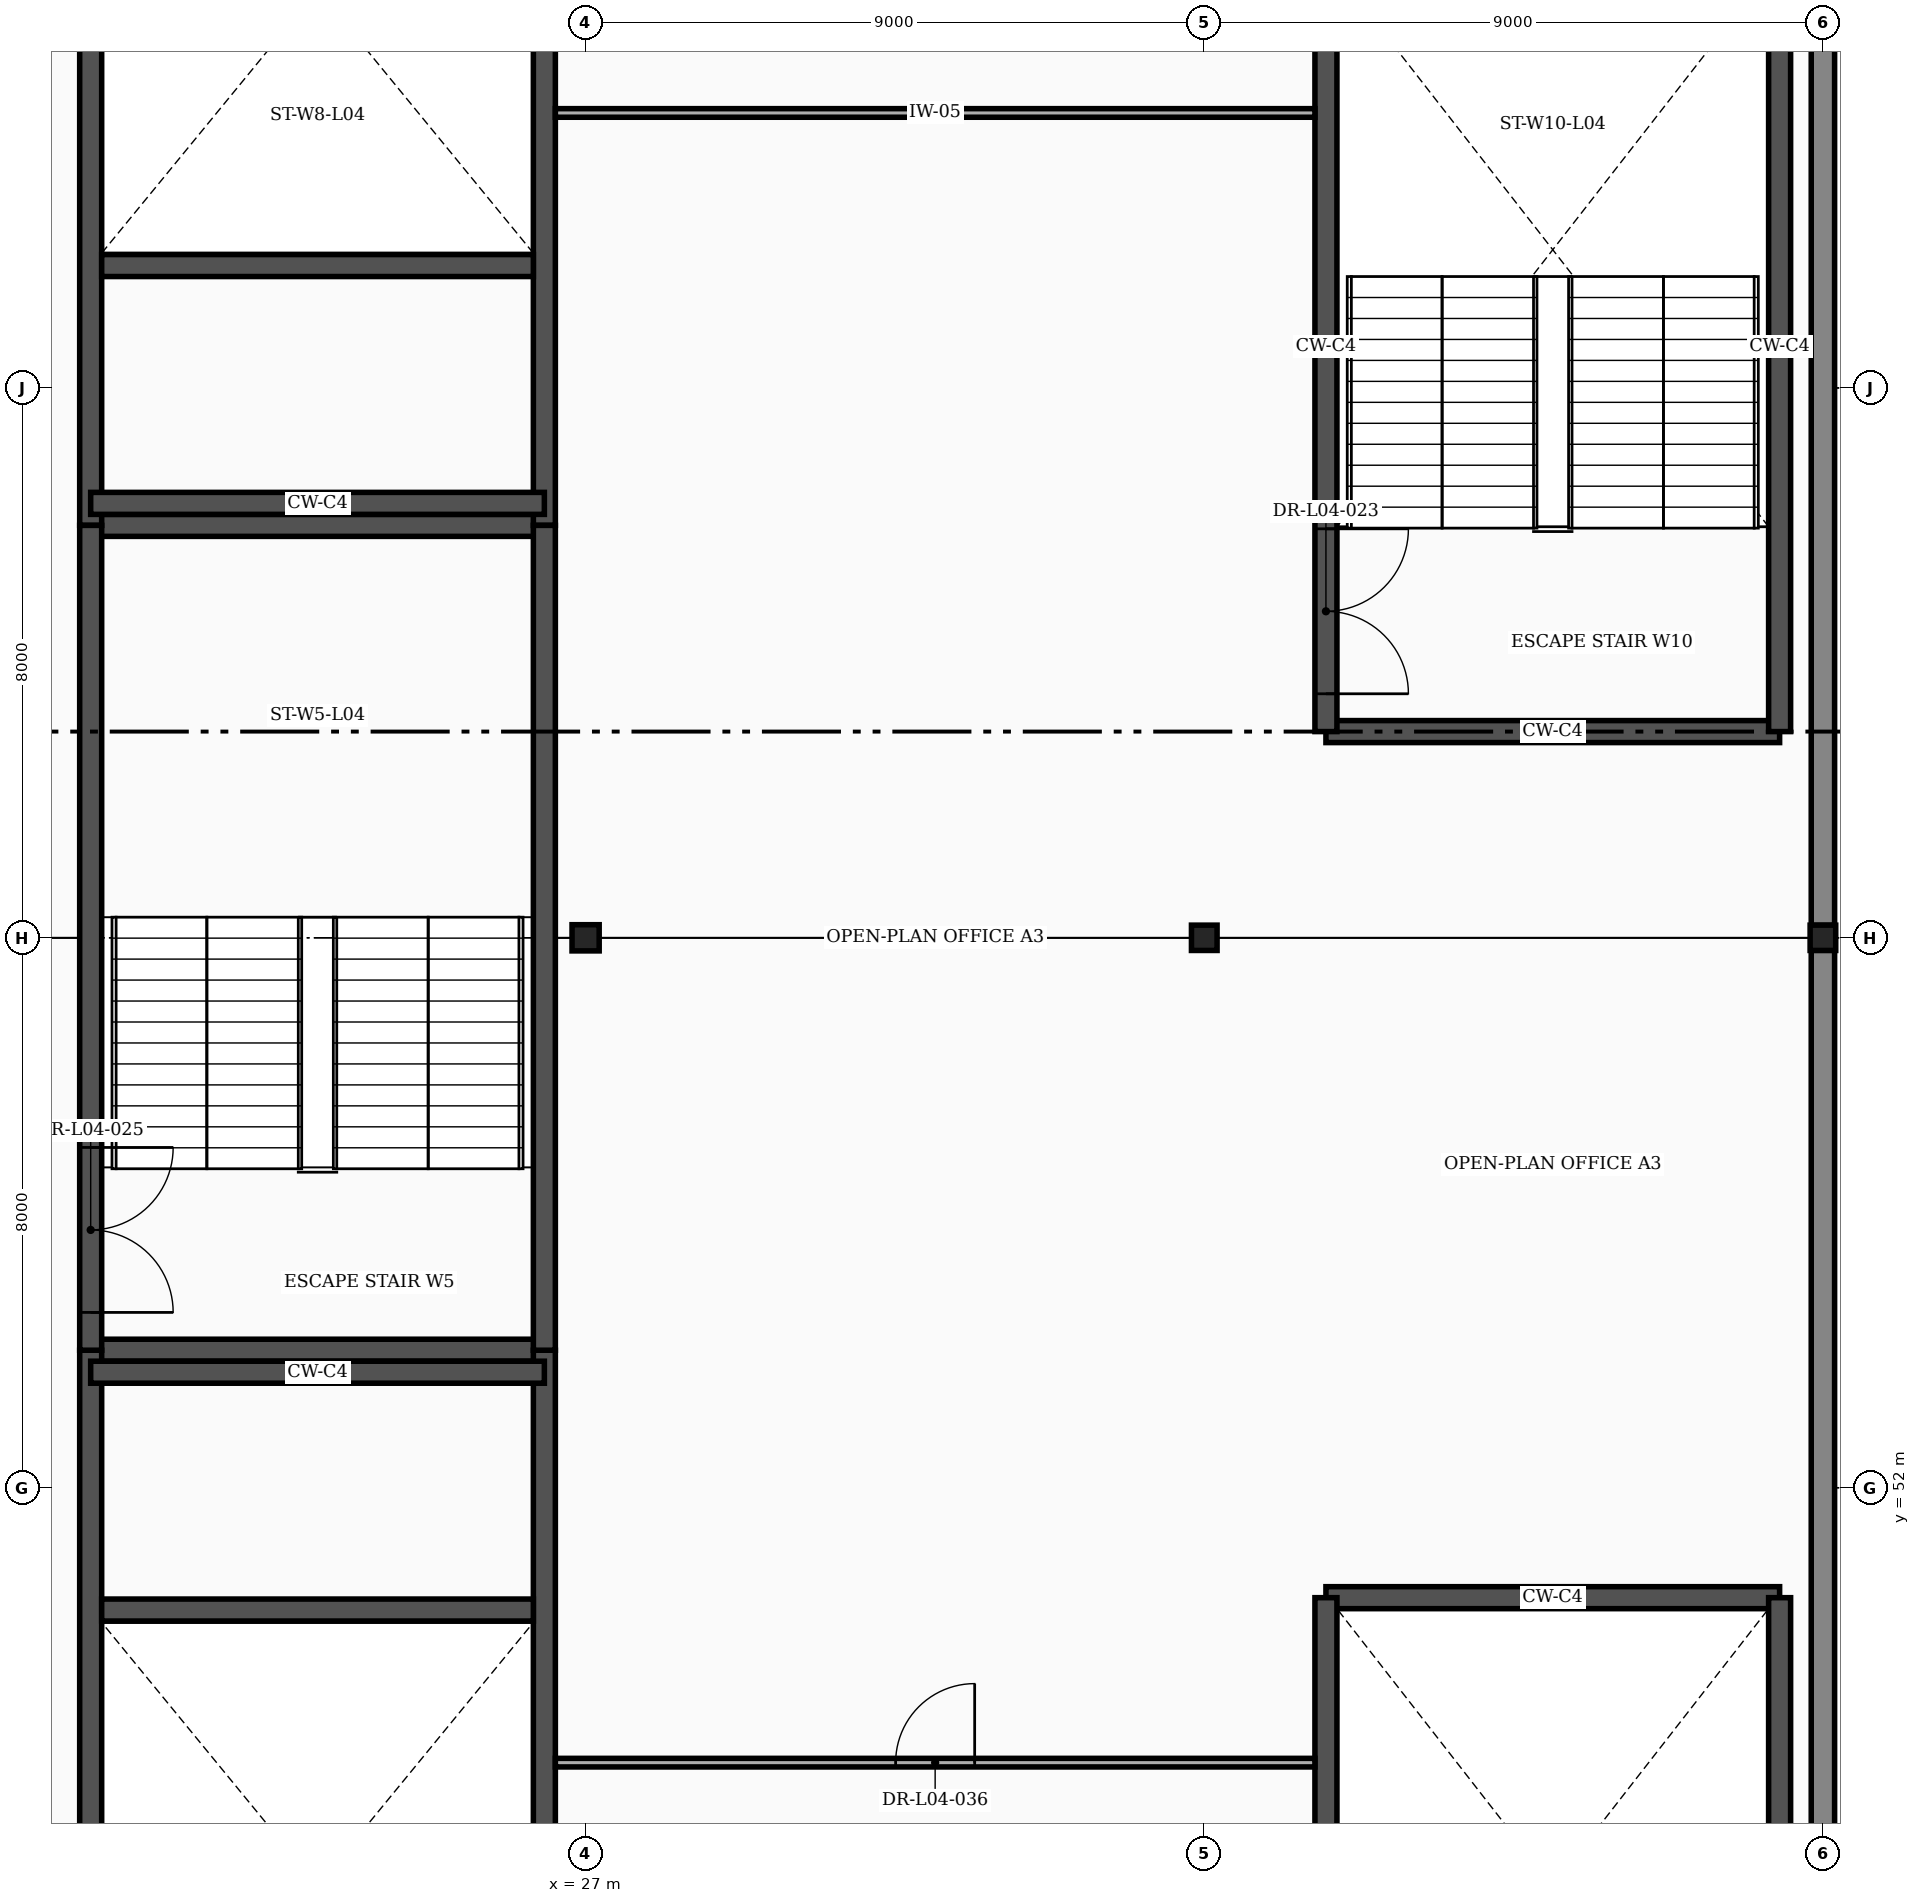
"""IFC4 building model, lengths in metres.
Left out: names, types, materials, properties, quantities, classifications, styles, units other than length and angle.
Written with IfcOpenShell. Run it as: python <this file> out.ifc"""

import sys

from ifc_helpers import new_model, si_unit, direction, frame, frame_2d, origin, origin_2d, place, context, subcontext, project, spatial, rectangle, i_section, extrude, element, fill, save


model = new_model("IFC4")
c1 = context("Model", 3, precision=1e-05, world=origin(), true_north=direction((0.0, 1.0)))
c2 = subcontext(c1, "Body", "Model", "MODEL_VIEW")
j1 = project(units=[si_unit("LENGTHUNIT", "METRE"), si_unit("PLANEANGLEUNIT", "RADIAN")], contexts=[c1])
p1 = place(None, origin())
s1 = spatial("IfcSite", under=j1, at=p1, CompositionType="ELEMENT")
p2 = place(p1, origin())
s2 = spatial("IfcBuilding", under=s1, at=p2, CompositionType="ELEMENT")
p3 = place(p2, frame((0.0, 0.0, 21.6)))
s3 = spatial("IfcBuildingStorey", under=s2, at=p3, CompositionType="ELEMENT", Elevation=21.6)
p4 = place(p3, frame((27.0, 60.0, 0.0), z_axis=(0.0, 0.0, 1.0), x_axis=(1.0, 0.0, 0.0)))
e1 = element("IfcColumn", 1, at=p4, inside=s3, PredefinedType="COLUMN", context=c2, shape_type="SweptSolid", body=[
    extrude(i_section(OverallWidth=0.395, OverallDepth=0.381, WebThickness=0.018, FlangeThickness=0.03, at=origin_2d()), origin(), (0.0, 0.0, 1.0), 3.9),
])
for number, where, z_axis, x_axis in (
    (2, (45.0, 60.0, 0.0), (0.0, 0.0, 1.0), (1.0, 0.0, 0.0)),
    (3, (36.0, 60.0, 0.0), (0.0, 0.0, 1.0), (1.0, 0.0, 0.0)),
):
    element("IfcColumn", number, at=place(p3, frame(where, z_axis=z_axis, x_axis=x_axis)), inside=s3, PredefinedType="COLUMN", context=c2, shape_type="SweptSolid", body=[
        extrude(i_section(OverallWidth=0.373, OverallDepth=0.368, WebThickness=0.014, FlangeThickness=0.024, FilletRadius=0.015, at=origin_2d()), origin(), (0.0, 0.0, 1.0), 3.9),
    ])
for number, where, z_axis, x_axis in (
    (4, (45.0, 36.182, 0.0), (0.0, 0.0, 1.0), (0.0, 1.0, 0.0)),
    (5, (45.0, 60.182, 0.0), (0.0, 0.0, 1.0), (0.0, 1.0, 0.0)),
):
    element("IfcWall", number, at=place(p3, frame(where, z_axis=z_axis, x_axis=x_axis)), inside=s3, PredefinedType="STANDARD", context=c2, shape_type="SweptSolid", body=[
        extrude(rectangle(XDim=23.636, YDim=0.34, at=frame_2d((11.818, 0.0))), origin(), (0.0, 0.0, 1.0), 2.973),
    ])
p5 = place(p3, frame((19.8, 54.0, 0.0), z_axis=(0.0, 0.0, 1.0), x_axis=(1.0, 0.0, 0.0)))
e6 = element("IfcWall", 6, at=p5, inside=s3, PredefinedType="SHEAR", context=c2, shape_type="SweptSolid", body=[
    extrude(rectangle(XDim=6.6, YDim=0.32, at=frame_2d((3.3, 0.0))), origin(), (0.0, 0.0, 1.0), 3.585),
])
p6 = place(p3, frame((19.8, 39.4, 0.0), z_axis=(0.0, 0.0, 1.0), x_axis=(0.0, 1.0, 0.0)))
e7 = element("IfcWall", 7, at=p6, inside=s3, PredefinedType="SHEAR", context=c2, shape_type="SweptSolid", body=[
    extrude(rectangle(XDim=14.6, YDim=0.32, at=frame_2d((7.3, 0.0))), origin(), (0.0, 0.0, 1.0), 3.585),
])
p7 = place(p6, frame((0.55, 0.0, 0.0)))
e8 = element("IfcOpeningElement", 8, at=p7, cuts=e7, PredefinedType="OPENING", context=c2, shape_type="SweptSolid", body=[
    extrude(rectangle(XDim=2.4, YDim=2.25, at=frame_2d((1.2, 1.125))), frame((0.0, 0.172, 0.0), z_axis=(0.0, -1.0, 0.0), x_axis=(1.0, 0.0, 0.0)), (0.0, 0.0, 1.0), 0.344),
])
p8 = place(p3, frame((26.4, 39.4, 0.0), z_axis=(0.0, 0.0, 1.0), x_axis=(0.0, 1.0, 0.0)))
e9 = element("IfcWall", 9, at=p8, inside=s3, PredefinedType="SHEAR", context=c2, shape_type="SweptSolid", body=[
    extrude(rectangle(XDim=14.6, YDim=0.32, at=frame_2d((7.3, 0.0))), origin(), (0.0, 0.0, 1.0), 3.585),
])
p9 = place(p3, frame((19.96, 50.22, 0.0), z_axis=(0.0, 0.0, 1.0), x_axis=(1.0, 0.0, 0.0)))
e10 = element("IfcWall", 10, at=p9, inside=s3, PredefinedType="SHEAR", context=c2, shape_type="SweptSolid", body=[
    extrude(rectangle(XDim=6.28, YDim=0.32, at=frame_2d((3.14, 0.0))), origin(), (0.0, 0.0, 1.0), 3.585),
])
p10 = place(p3, frame((19.8, 66.0, 0.0), z_axis=(0.0, 0.0, 1.0), x_axis=(1.0, 0.0, 0.0)))
e11 = element("IfcWall", 11, at=p10, inside=s3, PredefinedType="SHEAR", context=c2, shape_type="SweptSolid", body=[
    extrude(rectangle(XDim=6.6, YDim=0.32, at=frame_2d((3.3, 0.0))), origin(), (0.0, 0.0, 1.0), 3.585),
])
p11 = place(p3, frame((19.8, 66.0, 0.0), z_axis=(0.0, 0.0, 1.0), x_axis=(0.0, 1.0, 0.0)))
e12 = element("IfcWall", 12, at=p11, inside=s3, PredefinedType="SHEAR", context=c2, shape_type="SweptSolid", body=[
    extrude(rectangle(XDim=14.6, YDim=0.32, at=frame_2d((7.3, 0.0))), origin(), (0.0, 0.0, 1.0), 3.585),
])
p12 = place(p11, frame((11.65, 0.0, 0.0)))
e13 = element("IfcOpeningElement", 13, at=p12, cuts=e12, PredefinedType="OPENING", context=c2, shape_type="SweptSolid", body=[
    extrude(rectangle(XDim=2.4, YDim=2.25, at=frame_2d((1.2, 1.125))), frame((0.0, 0.172, 0.0), z_axis=(0.0, -1.0, 0.0), x_axis=(1.0, 0.0, 0.0)), (0.0, 0.0, 1.0), 0.344),
])
p13 = place(p3, frame((26.4, 66.0, 0.0), z_axis=(0.0, 0.0, 1.0), x_axis=(0.0, 1.0, 0.0)))
e14 = element("IfcWall", 14, at=p13, inside=s3, PredefinedType="SHEAR", context=c2, shape_type="SweptSolid", body=[
    extrude(rectangle(XDim=14.6, YDim=0.32, at=frame_2d((7.3, 0.0))), origin(), (0.0, 0.0, 1.0), 3.585),
])
p14 = place(p3, frame((19.96, 69.78, 0.0), z_axis=(0.0, 0.0, 1.0), x_axis=(1.0, 0.0, 0.0)))
e15 = element("IfcWall", 15, at=p14, inside=s3, PredefinedType="SHEAR", context=c2, shape_type="SweptSolid", body=[
    extrude(rectangle(XDim=6.28, YDim=0.32, at=frame_2d((3.14, 0.0))), origin(), (0.0, 0.0, 1.0), 3.585),
])
p15 = place(p3, frame((37.77, 50.4, 0.0), z_axis=(0.0, 0.0, 1.0), x_axis=(1.0, 0.0, 0.0)))
e16 = element("IfcWall", 16, at=p15, inside=s3, PredefinedType="SHEAR", context=c2, shape_type="SweptSolid", body=[
    extrude(rectangle(XDim=6.6, YDim=0.32, at=frame_2d((3.3, 0.0))), origin(), (0.0, 0.0, 1.0), 3.585),
])
p16 = place(p3, frame((37.77, 39.2, 0.0), z_axis=(0.0, 0.0, 1.0), x_axis=(0.0, 1.0, 0.0)))
e17 = element("IfcWall", 17, at=p16, inside=s3, PredefinedType="SHEAR", context=c2, shape_type="SweptSolid", body=[
    extrude(rectangle(XDim=11.2, YDim=0.32, at=frame_2d((5.6, 0.0))), origin(), (0.0, 0.0, 1.0), 3.585),
])
p17 = place(p16, frame((0.55, 0.0, 0.0)))
e18 = element("IfcOpeningElement", 18, at=p17, cuts=e17, PredefinedType="OPENING", context=c2, shape_type="SweptSolid", body=[
    extrude(rectangle(XDim=2.4, YDim=2.25, at=frame_2d((1.2, 1.125))), frame((0.0, 0.172, 0.0), z_axis=(0.0, -1.0, 0.0), x_axis=(1.0, 0.0, 0.0)), (0.0, 0.0, 1.0), 0.344),
])
p18 = place(p3, frame((44.37, 39.2, 0.0), z_axis=(0.0, 0.0, 1.0), x_axis=(0.0, 1.0, 0.0)))
e19 = element("IfcWall", 19, at=p18, inside=s3, PredefinedType="SHEAR", context=c2, shape_type="SweptSolid", body=[
    extrude(rectangle(XDim=11.2, YDim=0.32, at=frame_2d((5.6, 0.0))), origin(), (0.0, 0.0, 1.0), 3.585),
])
p19 = place(p3, frame((37.77, 63.0, 0.0), z_axis=(0.0, 0.0, 1.0), x_axis=(1.0, 0.0, 0.0)))
e20 = element("IfcWall", 20, at=p19, inside=s3, PredefinedType="SHEAR", context=c2, shape_type="SweptSolid", body=[
    extrude(rectangle(XDim=6.6, YDim=0.32, at=frame_2d((3.3, 0.0))), origin(), (0.0, 0.0, 1.0), 3.585),
])
p20 = place(p3, frame((37.77, 63.0, 0.0), z_axis=(0.0, 0.0, 1.0), x_axis=(0.0, 1.0, 0.0)))
e21 = element("IfcWall", 21, at=p20, inside=s3, PredefinedType="SHEAR", context=c2, shape_type="SweptSolid", body=[
    extrude(rectangle(XDim=11.2, YDim=0.32, at=frame_2d((5.6, 0.0))), origin(), (0.0, 0.0, 1.0), 3.585),
])
p21 = place(p20, frame((0.55, 0.0, 0.0)))
e22 = element("IfcOpeningElement", 22, at=p21, cuts=e21, PredefinedType="OPENING", context=c2, shape_type="SweptSolid", body=[
    extrude(rectangle(XDim=2.4, YDim=2.25, at=frame_2d((1.2, 1.125))), frame((0.0, 0.172, 0.0), z_axis=(0.0, -1.0, 0.0), x_axis=(1.0, 0.0, 0.0)), (0.0, 0.0, 1.0), 0.344),
])
p22 = place(p3, frame((44.37, 63.0, 0.0), z_axis=(0.0, 0.0, 1.0), x_axis=(0.0, 1.0, 0.0)))
e23 = element("IfcWall", 23, at=p22, inside=s3, PredefinedType="SHEAR", context=c2, shape_type="SweptSolid", body=[
    extrude(rectangle(XDim=11.2, YDim=0.32, at=frame_2d((5.6, 0.0))), origin(), (0.0, 0.0, 1.0), 3.585),
])
for number, where, z_axis, x_axis in (
    (24, (19.8, 53.68, 0.0), (0.0, 0.0, 1.0), (1.0, 0.0, 0.0)),
    (25, (19.8, 66.32, 0.0), (0.0, 0.0, 1.0), (1.0, 0.0, 0.0)),
):
    element("IfcWall", number, at=place(p3, frame(where, z_axis=z_axis, x_axis=x_axis)), inside=s3, PredefinedType="SHEAR", context=c2, shape_type="SweptSolid", body=[
        extrude(rectangle(XDim=6.6, YDim=0.32, at=frame_2d((3.3, 0.0))), origin(), (0.0, 0.0, 1.0), 3.585),
    ])
p23 = place(p3, frame((19.8, 54.0, 0.0), z_axis=(0.0, 0.0, 1.0), x_axis=(0.0, 1.0, 0.0)))
e26 = element("IfcWall", 26, at=p23, inside=s3, PredefinedType="SHEAR", context=c2, shape_type="SweptSolid", body=[
    extrude(rectangle(XDim=12.0, YDim=0.32, at=frame_2d((6.0, 0.0))), origin(), (0.0, 0.0, 1.0), 3.585),
])
p24 = place(p23, frame((0.55, 0.0, 0.0)))
e27 = element("IfcOpeningElement", 27, at=p24, cuts=e26, PredefinedType="OPENING", context=c2, shape_type="SweptSolid", body=[
    extrude(rectangle(XDim=2.4, YDim=2.25, at=frame_2d((1.2, 1.125))), frame((0.0, 0.172, 0.0), z_axis=(0.0, -1.0, 0.0), x_axis=(1.0, 0.0, 0.0)), (0.0, 0.0, 1.0), 0.344),
])
p25 = place(p3, frame((26.4, 54.0, 0.0), z_axis=(0.0, 0.0, 1.0), x_axis=(0.0, 1.0, 0.0)))
e28 = element("IfcWall", 28, at=p25, inside=s3, PredefinedType="SHEAR", context=c2, shape_type="SweptSolid", body=[
    extrude(rectangle(XDim=12.0, YDim=0.32, at=frame_2d((6.0, 0.0))), origin(), (0.0, 0.0, 1.0), 3.585),
])
p26 = place(p3, frame((26.56, 48.0, 0.0), z_axis=(0.0, 0.0, 1.0), x_axis=(1.0, 0.0, 0.0)))
e29 = element("IfcWall", 29, at=p26, inside=s3, PredefinedType="PARTITIONING", context=c2, shape_type="SweptSolid", body=[
    extrude(rectangle(XDim=11.05, YDim=0.125, at=frame_2d((5.525, 0.0))), origin(), (0.0, 0.0, 1.0), 3.585),
])
p27 = place(p26, frame((4.95, 0.0, 0.0)))
e30 = element("IfcOpeningElement", 30, at=p27, cuts=e29, PredefinedType="OPENING", context=c2, shape_type="SweptSolid", body=[
    extrude(rectangle(XDim=1.15, YDim=2.15, at=frame_2d((0.575, 1.075))), frame((0.0, 0.074, 0.0), z_axis=(0.0, -1.0, 0.0), x_axis=(1.0, 0.0, 0.0)), (0.0, 0.0, 1.0), 0.149),
])
p28 = place(p3, frame((26.56, 72.0, 0.0), z_axis=(0.0, 0.0, 1.0), x_axis=(1.0, 0.0, 0.0)))
e31 = element("IfcWall", 31, at=p28, inside=s3, PredefinedType="PARTITIONING", context=c2, shape_type="SweptSolid", body=[
    extrude(rectangle(XDim=11.05, YDim=0.125, at=frame_2d((5.525, 0.0))), origin(), (0.0, 0.0, 1.0), 3.585),
])
p29 = place(p21, frame((2.4, 0.0, 0.0), z_axis=(0.0, 0.0, 1.0), x_axis=(-1.0, 0.0, 0.0)))
e32 = element("IfcDoor", 32, at=p29, inside=s3, OperationType="DOUBLE_DOOR_SINGLE_SWING", PredefinedType="DOOR", context=c2, shape_type="SweptSolid", body=[
    extrude(rectangle(XDim=2.4, YDim=2.25, at=frame_2d((1.2, 1.125))), frame((0.0, 0.025, 0.0), z_axis=(0.0, -1.0, 0.0), x_axis=(1.0, 0.0, 0.0)), (0.0, 0.0, 1.0), 0.05),
])
fill(e22, e32)
p30 = place(p24, frame((2.4, 0.0, 0.0), z_axis=(0.0, 0.0, 1.0), x_axis=(-1.0, 0.0, 0.0)))
e33 = element("IfcDoor", 33, at=p30, inside=s3, OperationType="DOUBLE_DOOR_SINGLE_SWING", PredefinedType="DOOR", context=c2, shape_type="SweptSolid", body=[
    extrude(rectangle(XDim=2.4, YDim=2.25, at=frame_2d((1.2, 1.125))), frame((0.0, 0.025, 0.0), z_axis=(0.0, -1.0, 0.0), x_axis=(1.0, 0.0, 0.0)), (0.0, 0.0, 1.0), 0.05),
])
fill(e27, e33)
p31 = place(p27, origin())
e34 = element("IfcDoor", 34, at=p31, inside=s3, OperationType="SINGLE_SWING_RIGHT", PredefinedType="DOOR", context=c2, shape_type="SweptSolid", body=[
    extrude(rectangle(XDim=1.15, YDim=2.15, at=frame_2d((0.575, 1.075))), frame((0.0, 0.025, 0.0), z_axis=(0.0, -1.0, 0.0), x_axis=(1.0, 0.0, 0.0)), (0.0, 0.0, 1.0), 0.05),
])
fill(e30, e34)
save(model, sys.argv[1])
